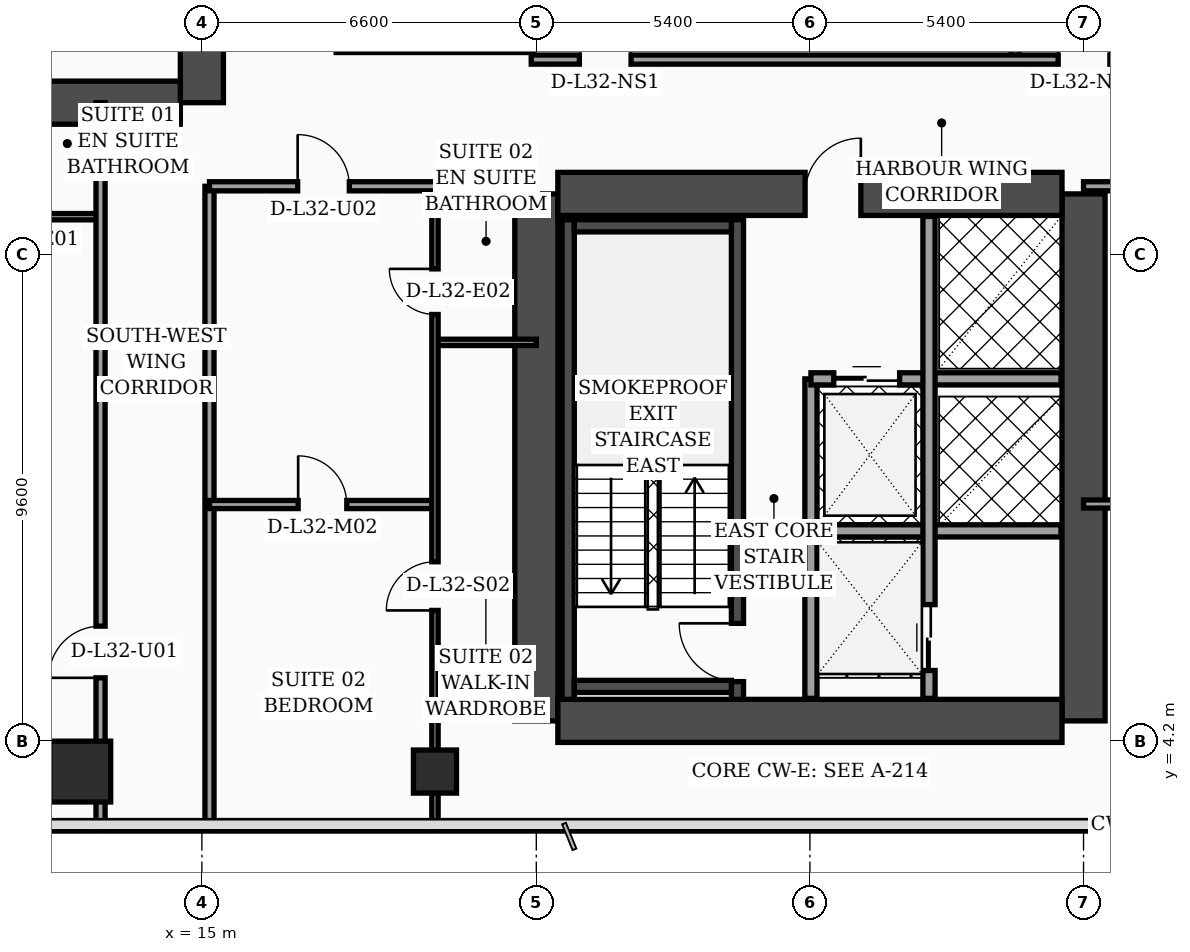
"""IFC4 building model, lengths in metres.
Left out: names, types, materials, properties, quantities, classifications, styles, units other than length and angle.
Written with IfcOpenShell. Run it as: python <this file> out.ifc"""

import sys

from ifc_helpers import new_model, si_unit, direction, frame, frame_2d, origin, origin_2d, place, context, subcontext, project, spatial, rectangle, hollow_rectangle, extrude, element, fill, save


model = new_model("IFC4")
c1 = context("Model", 3, precision=1e-05, world=origin(), true_north=direction((0.0, 1.0)))
c2 = subcontext(c1, "Body", "Model", "MODEL_VIEW")
j1 = project(units=[si_unit("LENGTHUNIT", "METRE"), si_unit("PLANEANGLEUNIT", "RADIAN")], contexts=[c1])
p1 = place(None, origin())
s1 = spatial("IfcSite", under=j1, at=p1, CompositionType="ELEMENT")
p2 = place(p1, origin())
s2 = spatial("IfcBuilding", under=s1, at=p2, CompositionType="ELEMENT")
p3 = place(p2, frame((0.0, 0.0, 131.6)))
s3 = spatial("IfcBuildingStorey", under=s2, at=p3, CompositionType="ELEMENT", Elevation=131.6)
p4 = place(p3, frame((15.0, 16.8, 0.0), z_axis=(0.0, 0.0, 1.0), x_axis=(0.0, 1.0, 0.0)))
e1 = element("IfcWall", 1, at=p4, inside=s3, PredefinedType="SHEAR", context=c2, shape_type="SweptSolid", body=[
    extrude(rectangle(XDim=21.6, YDim=0.85, at=frame_2d((10.8, 0.0))), origin(), (0.0, 0.0, 1.0), 3.56),
])
p5 = place(p4, frame((8.65, 0.0, 0.0)))
e2 = element("IfcOpeningElement", 2, at=p5, cuts=e1, PredefinedType="OPENING", context=c2, shape_type="SweptSolid", body=[
    extrude(rectangle(XDim=1.1, YDim=2.2, at=frame_2d((0.55, 1.1))), frame((0.0, 0.435, 0.0), z_axis=(0.0, -1.0, 0.0), x_axis=(1.0, 0.0, 0.0)), (0.0, 0.0, 1.0), 0.87),
])
p6 = place(p4, frame((10.85, 0.0, 0.0)))
e3 = element("IfcOpeningElement", 3, at=p6, cuts=e1, PredefinedType="OPENING", context=c2, shape_type="SweptSolid", body=[
    extrude(rectangle(XDim=1.1, YDim=2.2, at=frame_2d((0.55, 1.1))), frame((0.0, 0.435, 0.0), z_axis=(0.0, -1.0, 0.0), x_axis=(1.0, 0.0, 0.0)), (0.0, 0.0, 1.0), 0.87),
])
p7 = place(p4, frame((13.5, 0.0, 0.0)))
e4 = element("IfcOpeningElement", 4, at=p7, cuts=e1, PredefinedType="OPENING", context=c2, shape_type="SweptSolid", body=[
    extrude(rectangle(XDim=1.1, YDim=2.2, at=frame_2d((0.55, 1.1))), frame((0.0, 0.435, 0.0), z_axis=(0.0, -1.0, 0.0), x_axis=(1.0, 0.0, 0.0)), (0.0, 0.0, 1.0), 0.87),
])
p8 = place(p4, frame((16.15, 0.0, 0.0)))
e5 = element("IfcOpeningElement", 5, at=p8, cuts=e1, PredefinedType="OPENING", context=c2, shape_type="SweptSolid", body=[
    extrude(rectangle(XDim=1.1, YDim=2.2, at=frame_2d((0.55, 1.1))), frame((0.0, 0.435, 0.0), z_axis=(0.0, -1.0, 0.0), x_axis=(1.0, 0.0, 0.0)), (0.0, 0.0, 1.0), 0.87),
])
p9 = place(p3, frame((4.625, 16.8, 0.0), z_axis=(0.0, 0.0, 1.0), x_axis=(1.0, 0.0, 0.0)))
e6 = element("IfcWall", 6, at=p9, inside=s3, PredefinedType="SHEAR", context=c2, shape_type="SweptSolid", body=[
    extrude(rectangle(XDim=9.95, YDim=0.85, at=frame_2d((4.975, 0.0))), origin(), (0.0, 0.0, 1.0), 3.56),
])
for number, where, z_axis, x_axis in (
    (7, (21.6, 4.6, 0.0), (0.0, 0.0, 1.0), (0.0, 1.0, 0.0)),
    (8, (32.4, 4.6, 0.0), (0.0, 0.0, 1.0), (0.0, 1.0, 0.0)),
):
    element("IfcWall", number, at=place(p3, frame(where, z_axis=z_axis, x_axis=x_axis)), inside=s3, PredefinedType="SHEAR", context=c2, shape_type="SweptSolid", body=[
        extrude(rectangle(XDim=10.4, YDim=0.85, at=frame_2d((5.2, 0.0))), origin(), (0.0, 0.0, 1.0), 3.56),
    ])
p10 = place(p3, frame((22.025, 15.0, 0.0), z_axis=(0.0, 0.0, 1.0), x_axis=(1.0, 0.0, 0.0)))
e9 = element("IfcWall", 9, at=p10, inside=s3, PredefinedType="SHEAR", context=c2, shape_type="SweptSolid", body=[
    extrude(rectangle(XDim=9.95, YDim=0.85, at=frame_2d((4.975, 0.0))), origin(), (0.0, 0.0, 1.0), 3.56),
])
p11 = place(p10, frame((4.88, 0.0, 0.0)))
e10 = element("IfcOpeningElement", 10, at=p11, cuts=e9, PredefinedType="OPENING", context=c2, shape_type="SweptSolid", body=[
    extrude(rectangle(XDim=1.1, YDim=2.2, at=frame_2d((0.55, 1.1))), frame((0.0, 0.435, 0.0), z_axis=(0.0, -1.0, 0.0), x_axis=(1.0, 0.0, 0.0)), (0.0, 0.0, 1.0), 0.87),
])
p12 = place(p3, frame((22.025, 4.6, 0.0), z_axis=(0.0, 0.0, 1.0), x_axis=(1.0, 0.0, 0.0)))
e11 = element("IfcWall", 11, at=p12, inside=s3, PredefinedType="SHEAR", context=c2, shape_type="SweptSolid", body=[
    extrude(rectangle(XDim=9.95, YDim=0.85, at=frame_2d((4.975, 0.0))), origin(), (0.0, 0.0, 1.0), 3.56),
])
p13 = place(p3, frame((22.23, 5.025, 0.0), z_axis=(0.0, 0.0, 1.0), x_axis=(0.0, 1.0, 0.0)))
e12 = element("IfcWall", 12, at=p13, inside=s3, PredefinedType="SOLIDWALL", context=c2, shape_type="SweptSolid", body=[
    extrude(rectangle(XDim=9.465, YDim=0.24, at=frame_2d((4.732, 0.0))), origin(), (0.0, 0.0, 1.0), 3.56),
])
p14 = place(p3, frame((25.57, 5.025, 0.0), z_axis=(0.0, 0.0, 1.0), x_axis=(0.0, 1.0, 0.0)))
e13 = element("IfcWall", 13, at=p14, inside=s3, PredefinedType="SOLIDWALL", context=c2, shape_type="SweptSolid", body=[
    extrude(rectangle(XDim=9.465, YDim=0.24, at=frame_2d((4.732, 0.0))), origin(), (0.0, 0.0, 1.0), 3.56),
])
p15 = place(p14, frame((0.35, 0.0, 0.0)))
e14 = element("IfcOpeningElement", 14, at=p15, cuts=e13, PredefinedType="OPENING", context=c2, shape_type="SweptSolid", body=[
    extrude(rectangle(XDim=1.15, YDim=2.2, at=frame_2d((0.575, 1.1))), frame((0.0, 0.13, 0.0), z_axis=(0.0, -1.0, 0.0), x_axis=(1.0, 0.0, 0.0)), (0.0, 0.0, 1.0), 0.26),
])
for number, where, z_axis, x_axis in (
    (15, (22.35, 5.28, 0.0), (0.0, 0.0, 1.0), (1.0, 0.0, 0.0)),
    (16, (22.35, 14.37, 0.0), (0.0, 0.0, 1.0), (1.0, 0.0, 0.0)),
):
    element("IfcWall", number, at=place(p3, frame(where, z_axis=z_axis, x_axis=x_axis)), inside=s3, PredefinedType="SOLIDWALL", context=c2, shape_type="SweptSolid", body=[
        extrude(rectangle(XDim=3.1, YDim=0.24, at=frame_2d((1.55, 0.0))), origin(), (0.0, 0.0, 1.0), 3.56),
    ])
p16 = place(p3, frame((12.6, 3.6, 0.0), z_axis=(0.0, 0.0, 1.0), x_axis=(1.0, 0.0, 0.0)))
e17 = element("IfcColumn", 17, at=p16, inside=s3, PredefinedType="COLUMN", context=c2, shape_type="SweptSolid", body=[
    extrude(rectangle(XDim=1.2, YDim=1.2, at=origin_2d()), origin(), (0.0, 0.0, 1.0), 3.56),
])
p17 = place(p3, frame((19.6, 3.6, 0.0), z_axis=(0.0, 0.0, 1.0), x_axis=(1.0, 0.0, 0.0)))
e18 = element("IfcColumn", 18, at=p17, inside=s3, PredefinedType="COLUMN", context=c2, shape_type="SweptSolid", body=[
    extrude(hollow_rectangle(XDim=0.85, YDim=0.85, WallThickness=0.036, at=origin_2d()), origin(), (0.0, 0.0, 1.0), 3.56),
])
p18 = place(p3, frame((27.02, 5.045, 0.0), z_axis=(0.0, 0.0, 1.0), x_axis=(0.0, 1.0, 0.0)))
e19 = element("IfcWall", 19, at=p18, inside=s3, PredefinedType="SOLIDWALL", context=c2, shape_type="SweptSolid", body=[
    extrude(rectangle(XDim=6.305, YDim=0.24, at=frame_2d((3.153, 0.0))), origin(), (0.0, 0.0, 1.0), 3.56),
])
p19 = place(p3, frame((27.02, 11.35, 0.0), z_axis=(0.0, 0.0, 1.0), x_axis=(1.0, 0.0, 0.0)))
e20 = element("IfcWall", 20, at=p19, inside=s3, PredefinedType="SOLIDWALL", context=c2, shape_type="SweptSolid", body=[
    extrude(rectangle(XDim=4.935, YDim=0.24, at=frame_2d((2.468, 0.0))), origin(), (0.0, 0.0, 1.0), 3.56),
])
p20 = place(p19, frame((0.45, 0.0, 0.0)))
e21 = element("IfcOpeningElement", 21, at=p20, cuts=e20, PredefinedType="OPENING", context=c2, shape_type="SweptSolid", body=[
    extrude(rectangle(XDim=1.3, YDim=2.35, at=frame_2d((0.65, 1.175))), frame((0.0, 0.13, 0.0), z_axis=(0.0, -1.0, 0.0), x_axis=(1.0, 0.0, 0.0)), (0.0, 0.0, 1.0), 0.26),
])
p21 = place(p3, frame((27.02, 8.35, 0.0), z_axis=(0.0, 0.0, 1.0), x_axis=(1.0, 0.0, 0.0)))
e22 = element("IfcWall", 22, at=p21, inside=s3, PredefinedType="SOLIDWALL", context=c2, shape_type="SweptSolid", body=[
    extrude(rectangle(XDim=4.935, YDim=0.24, at=frame_2d((2.468, 0.0))), origin(), (0.0, 0.0, 1.0), 3.56),
])
p22 = place(p3, frame((29.35, 5.045, 0.0), z_axis=(0.0, 0.0, 1.0), x_axis=(0.0, 1.0, 0.0)))
e23 = element("IfcWall", 23, at=p22, inside=s3, PredefinedType="SOLIDWALL", context=c2, shape_type="SweptSolid", body=[
    extrude(rectangle(XDim=9.51, YDim=0.24, at=frame_2d((4.755, 0.0))), origin(), (0.0, 0.0, 1.0), 3.56),
])
p23 = place(p22, frame((0.55, 0.0, 0.0)))
e24 = element("IfcOpeningElement", 24, at=p23, cuts=e23, PredefinedType="OPENING", context=c2, shape_type="SweptSolid", body=[
    extrude(rectangle(XDim=1.3, YDim=2.35, at=frame_2d((0.65, 1.175))), frame((0.0, 0.13, 0.0), z_axis=(0.0, -1.0, 0.0), x_axis=(1.0, 0.0, 0.0)), (0.0, 0.0, 1.0), 0.26),
])
p24 = place(p3, frame((3.2, 14.55, 0.0), z_axis=(0.0, 0.0, 1.0), x_axis=(1.0, 0.0, 0.0)))
e25 = element("IfcWall", 25, at=p24, inside=s3, PredefinedType="PARTITIONING", context=c2, shape_type="SweptSolid", body=[
    extrude(rectangle(XDim=9.8, YDim=0.125, at=frame_2d((4.9, 0.0))), origin(), (0.0, 0.0, 1.0), 2.84),
])
p25 = place(p24, frame((3.32, 0.0, 0.0)))
e26 = element("IfcOpeningElement", 26, at=p25, cuts=e25, PredefinedType="OPENING", context=c2, shape_type="SweptSolid", body=[
    extrude(rectangle(XDim=0.96, YDim=2.2, at=frame_2d((0.48, 1.1))), frame((0.0, 0.073, 0.0), z_axis=(0.0, -1.0, 0.0), x_axis=(1.0, 0.0, 0.0)), (0.0, 0.0, 1.0), 0.145),
])
p26 = place(p24, frame((7.89, 0.0, 0.0)))
e27 = element("IfcOpeningElement", 27, at=p26, cuts=e25, PredefinedType="OPENING", context=c2, shape_type="SweptSolid", body=[
    extrude(rectangle(XDim=0.9, YDim=2.15, at=frame_2d((0.45, 1.075))), frame((0.0, 0.073, 0.0), z_axis=(0.0, -1.0, 0.0), x_axis=(1.0, 0.0, 0.0)), (0.0, 0.0, 1.0), 0.145),
])
p27 = place(p3, frame((13.0, 2.44, 0.0), z_axis=(0.0, 0.0, 1.0), x_axis=(0.0, 1.0, 0.0)))
e28 = element("IfcWall", 28, at=p27, inside=s3, PredefinedType="PARTITIONING", context=c2, shape_type="SweptSolid", body=[
    extrude(rectangle(XDim=14.36, YDim=0.18, at=frame_2d((7.18, 0.0))), origin(), (0.0, 0.0, 1.0), 2.84),
])
p28 = place(p27, frame((3.01, 0.0, 0.0)))
e29 = element("IfcOpeningElement", 29, at=p28, cuts=e28, PredefinedType="OPENING", context=c2, shape_type="SweptSolid", body=[
    extrude(rectangle(XDim=1.02, YDim=2.2, at=frame_2d((0.51, 1.1))), frame((0.0, 0.1, 0.0), z_axis=(0.0, -1.0, 0.0), x_axis=(1.0, 0.0, 0.0)), (0.0, 0.0, 1.0), 0.2),
])
p29 = place(p3, frame((15.15, 2.44, 0.0), z_axis=(0.0, 0.0, 1.0), x_axis=(0.0, 1.0, 0.0)))
e30 = element("IfcWall", 30, at=p29, inside=s3, PredefinedType="PARTITIONING", context=c2, shape_type="SweptSolid", body=[
    extrude(rectangle(XDim=12.71, YDim=0.18, at=frame_2d((6.355, 0.0))), origin(), (0.0, 0.0, 1.0), 3.04),
])
p30 = place(p3, frame((19.6, 12.07, 0.0), z_axis=(0.0, 0.0, 1.0), x_axis=(1.0, 0.0, 0.0)))
e31 = element("IfcWall", 31, at=p30, inside=s3, PredefinedType="PARTITIONING", context=c2, shape_type="SweptSolid", body=[
    extrude(rectangle(XDim=2.0, YDim=0.125, at=frame_2d((1.0, 0.0))), origin(), (0.0, 0.0, 1.0), 3.56),
])
p31 = place(p3, frame((15.15, 8.87, 0.0), z_axis=(0.0, 0.0, 1.0), x_axis=(1.0, 0.0, 0.0)))
e32 = element("IfcWall", 32, at=p31, inside=s3, PredefinedType="PARTITIONING", context=c2, shape_type="SweptSolid", body=[
    extrude(rectangle(XDim=4.45, YDim=0.16, at=frame_2d((2.225, 0.0))), origin(), (0.0, 0.0, 1.0), 3.56),
])
p32 = place(p31, frame((1.75, 0.0, 0.0)))
e33 = element("IfcOpeningElement", 33, at=p32, cuts=e32, PredefinedType="OPENING", context=c2, shape_type="SweptSolid", body=[
    extrude(rectangle(XDim=0.96, YDim=2.2, at=frame_2d((0.48, 1.1))), frame((0.0, 0.09, 0.0), z_axis=(0.0, -1.0, 0.0), x_axis=(1.0, 0.0, 0.0)), (0.0, 0.0, 1.0), 0.18),
])
p33 = place(p3, frame((19.6, 2.44, 0.0), z_axis=(0.0, 0.0, 1.0), x_axis=(0.0, 1.0, 0.0)))
e34 = element("IfcWall", 34, at=p33, inside=s3, PredefinedType="PARTITIONING", context=c2, shape_type="SweptSolid", body=[
    extrude(rectangle(XDim=12.71, YDim=0.125, at=frame_2d((6.355, 0.0))), origin(), (0.0, 0.0, 1.0), 2.49),
])
p34 = place(p33, frame((4.34, 0.0, 0.0)))
e35 = element("IfcOpeningElement", 35, at=p34, cuts=e34, PredefinedType="OPENING", context=c2, shape_type="SweptSolid", body=[
    extrude(rectangle(XDim=0.96, YDim=2.2, at=frame_2d((0.48, 1.1))), frame((0.0, 0.073, 0.0), z_axis=(0.0, -1.0, 0.0), x_axis=(1.0, 0.0, 0.0)), (0.0, 0.0, 1.0), 0.145),
])
p35 = place(p33, frame((10.18, 0.0, 0.0)))
e36 = element("IfcOpeningElement", 36, at=p35, cuts=e34, PredefinedType="OPENING", context=c2, shape_type="SweptSolid", body=[
    extrude(rectangle(XDim=0.9, YDim=2.15, at=frame_2d((0.45, 1.075))), frame((0.0, 0.073, 0.0), z_axis=(0.0, -1.0, 0.0), x_axis=(1.0, 0.0, 0.0)), (0.0, 0.0, 1.0), 0.145),
])
p36 = place(p3, frame((15.15, 15.15, 0.0), z_axis=(0.0, 0.0, 1.0), x_axis=(1.0, 0.0, 0.0)))
e37 = element("IfcWall", 37, at=p36, inside=s3, PredefinedType="PARTITIONING", context=c2, shape_type="SweptSolid", body=[
    extrude(rectangle(XDim=6.45, YDim=0.18, at=frame_2d((3.225, 0.0))), origin(), (0.0, 0.0, 1.0), 2.49),
])
p37 = place(p36, frame((1.74, 0.0, 0.0)))
e38 = element("IfcOpeningElement", 38, at=p37, cuts=e37, PredefinedType="OPENING", context=c2, shape_type="SweptSolid", body=[
    extrude(rectangle(XDim=1.02, YDim=2.2, at=frame_2d((0.51, 1.1))), frame((0.0, 0.1, 0.0), z_axis=(0.0, -1.0, 0.0), x_axis=(1.0, 0.0, 0.0)), (0.0, 0.0, 1.0), 0.2),
])
p38 = place(p3, frame((17.65, 17.88, 0.0), z_axis=(0.0, 0.0, 1.0), x_axis=(1.0, 0.0, 0.0)))
e39 = element("IfcWall", 39, at=p38, inside=s3, PredefinedType="PARTITIONING", context=c2, shape_type="SweptSolid", body=[
    extrude(rectangle(XDim=3.9, YDim=0.18, at=frame_2d((1.95, 0.0))), origin(), (0.0, 0.0, 1.0), 3.56),
])
p39 = place(p3, frame((32.4, 8.88, 0.0), z_axis=(0.0, 0.0, 1.0), x_axis=(1.0, 0.0, 0.0)))
e40 = element("IfcWall", 40, at=p39, inside=s3, PredefinedType="PARTITIONING", context=c2, shape_type="SweptSolid", body=[
    extrude(rectangle(XDim=7.02, YDim=0.16, at=frame_2d((3.51, 0.0))), origin(), (0.0, 0.0, 1.0), 2.84),
])
p40 = place(p39, frame((3.03, 0.0, 0.0)))
e41 = element("IfcOpeningElement", 41, at=p40, cuts=e40, PredefinedType="OPENING", context=c2, shape_type="SweptSolid", body=[
    extrude(rectangle(XDim=0.96, YDim=2.2, at=frame_2d((0.48, 1.1))), frame((0.0, 0.09, 0.0), z_axis=(0.0, -1.0, 0.0), x_axis=(1.0, 0.0, 0.0)), (0.0, 0.0, 1.0), 0.18),
])
p41 = place(p3, frame((32.4, 15.15, 0.0), z_axis=(0.0, 0.0, 1.0), x_axis=(1.0, 0.0, 0.0)))
e42 = element("IfcWall", 42, at=p41, inside=s3, PredefinedType="PARTITIONING", context=c2, shape_type="SweptSolid", body=[
    extrude(rectangle(XDim=9.15, YDim=0.18, at=frame_2d((4.575, 0.0))), origin(), (0.0, 0.0, 1.0), 2.84),
])
p42 = place(p41, frame((3.1, 0.0, 0.0)))
e43 = element("IfcOpeningElement", 43, at=p42, cuts=e42, PredefinedType="OPENING", context=c2, shape_type="SweptSolid", body=[
    extrude(rectangle(XDim=1.02, YDim=2.2, at=frame_2d((0.51, 1.1))), frame((0.0, 0.1, 0.0), z_axis=(0.0, -1.0, 0.0), x_axis=(1.0, 0.0, 0.0)), (0.0, 0.0, 1.0), 0.2),
])
p43 = place(p3, frame((31.05, 17.65, 0.0), z_axis=(0.0, 0.0, 1.0), x_axis=(0.0, 1.0, 0.0)))
e44 = element("IfcWall", 44, at=p43, inside=s3, PredefinedType="PARTITIONING", context=c2, shape_type="SweptSolid", body=[
    extrude(rectangle(XDim=12.1, YDim=0.16, at=frame_2d((6.05, 0.0))), origin(), (0.0, 0.0, 1.0), 2.84),
])
p44 = place(p3, frame((21.5, 17.65, 0.0), z_axis=(0.0, 0.0, 1.0), x_axis=(1.0, 0.0, 0.0)))
e45 = element("IfcWall", 45, at=p44, inside=s3, PredefinedType="PARTITIONING", context=c2, shape_type="SweptSolid", body=[
    extrude(rectangle(XDim=17.7, YDim=0.18, at=frame_2d((8.85, 0.0))), origin(), (0.0, 0.0, 1.0), 2.84),
])
p45 = place(p44, frame((0.95, 0.0, 0.0)))
e46 = element("IfcOpeningElement", 46, at=p45, cuts=e45, PredefinedType="OPENING", context=c2, shape_type="SweptSolid", body=[
    extrude(rectangle(XDim=1.02, YDim=2.2, at=frame_2d((0.51, 1.1))), frame((0.0, 0.1, 0.0), z_axis=(0.0, -1.0, 0.0), x_axis=(1.0, 0.0, 0.0)), (0.0, 0.0, 1.0), 0.2),
])
p46 = place(p44, frame((10.4, 0.0, 0.0)))
e47 = element("IfcOpeningElement", 47, at=p46, cuts=e45, PredefinedType="OPENING", context=c2, shape_type="SweptSolid", body=[
    extrude(rectangle(XDim=1.02, YDim=2.2, at=frame_2d((0.51, 1.1))), frame((0.0, 0.1, 0.0), z_axis=(0.0, -1.0, 0.0), x_axis=(1.0, 0.0, 0.0)), (0.0, 0.0, 1.0), 0.2),
])
p47 = place(p20, origin())
e48 = element("IfcDoor", 48, at=p47, inside=s3, OperationType="DOUBLE_DOOR_SLIDING", PredefinedType="DOOR", context=c2, shape_type="SweptSolid", body=[
    extrude(rectangle(XDim=1.3, YDim=2.35, at=frame_2d((0.65, 1.175))), frame((0.0, 0.025, 0.0), z_axis=(0.0, -1.0, 0.0), x_axis=(1.0, 0.0, 0.0)), (0.0, 0.0, 1.0), 0.05),
])
fill(e21, e48)
p48 = place(p23, origin())
e49 = element("IfcDoor", 49, at=p48, inside=s3, OperationType="DOUBLE_DOOR_SLIDING", PredefinedType="DOOR", context=c2, shape_type="SweptSolid", body=[
    extrude(rectangle(XDim=1.3, YDim=2.35, at=frame_2d((0.65, 1.175))), frame((0.0, 0.025, 0.0), z_axis=(0.0, -1.0, 0.0), x_axis=(1.0, 0.0, 0.0)), (0.0, 0.0, 1.0), 0.05),
])
fill(e24, e49)
p49 = place(p28, origin())
e50 = element("IfcDoor", 50, at=p49, inside=s3, OperationType="SINGLE_SWING_LEFT", PredefinedType="DOOR", context=c2, shape_type="SweptSolid", body=[
    extrude(rectangle(XDim=1.02, YDim=2.2, at=frame_2d((0.51, 1.1))), frame((0.0, 0.025, 0.0), z_axis=(0.0, -1.0, 0.0), x_axis=(1.0, 0.0, 0.0)), (0.0, 0.0, 1.0), 0.05),
])
fill(e29, e50)
p50 = place(p32, origin())
e51 = element("IfcDoor", 51, at=p50, inside=s3, OperationType="SINGLE_SWING_LEFT", PredefinedType="DOOR", context=c2, shape_type="SweptSolid", body=[
    extrude(rectangle(XDim=0.96, YDim=2.2, at=frame_2d((0.48, 1.1))), frame((0.0, 0.025, 0.0), z_axis=(0.0, -1.0, 0.0), x_axis=(1.0, 0.0, 0.0)), (0.0, 0.0, 1.0), 0.05),
])
fill(e33, e51)
p51 = place(p34, origin())
e52 = element("IfcDoor", 52, at=p51, inside=s3, OperationType="SINGLE_SWING_LEFT", PredefinedType="DOOR", context=c2, shape_type="SweptSolid", body=[
    extrude(rectangle(XDim=0.96, YDim=2.2, at=frame_2d((0.48, 1.1))), frame((0.0, 0.025, 0.0), z_axis=(0.0, -1.0, 0.0), x_axis=(1.0, 0.0, 0.0)), (0.0, 0.0, 1.0), 0.05),
])
fill(e35, e52)
p52 = place(p35, origin())
e53 = element("IfcDoor", 53, at=p52, inside=s3, OperationType="SINGLE_SWING_RIGHT", PredefinedType="DOOR", context=c2, shape_type="SweptSolid", body=[
    extrude(rectangle(XDim=0.9, YDim=2.15, at=frame_2d((0.45, 1.075))), frame((0.0, 0.025, 0.0), z_axis=(0.0, -1.0, 0.0), x_axis=(1.0, 0.0, 0.0)), (0.0, 0.0, 1.0), 0.05),
])
fill(e36, e53)
p53 = place(p37, origin())
e54 = element("IfcDoor", 54, at=p53, inside=s3, OperationType="SINGLE_SWING_LEFT", PredefinedType="DOOR", context=c2, shape_type="SweptSolid", body=[
    extrude(rectangle(XDim=1.02, YDim=2.2, at=frame_2d((0.51, 1.1))), frame((0.0, 0.025, 0.0), z_axis=(0.0, -1.0, 0.0), x_axis=(1.0, 0.0, 0.0)), (0.0, 0.0, 1.0), 0.05),
])
fill(e38, e54)
p54 = place(p45, origin())
e55 = element("IfcDoor", 55, at=p54, inside=s3, OperationType="SINGLE_SWING_RIGHT", PredefinedType="DOOR", context=c2, shape_type="SweptSolid", body=[
    extrude(rectangle(XDim=1.02, YDim=2.2, at=frame_2d((0.51, 1.1))), frame((0.0, 0.025, 0.0), z_axis=(0.0, -1.0, 0.0), x_axis=(1.0, 0.0, 0.0)), (0.0, 0.0, 1.0), 0.05),
])
fill(e46, e55)
p55 = place(p46, origin())
e56 = element("IfcDoor", 56, at=p55, inside=s3, OperationType="SINGLE_SWING_LEFT", PredefinedType="DOOR", context=c2, shape_type="SweptSolid", body=[
    extrude(rectangle(XDim=1.02, YDim=2.2, at=frame_2d((0.51, 1.1))), frame((0.0, 0.025, 0.0), z_axis=(0.0, -1.0, 0.0), x_axis=(1.0, 0.0, 0.0)), (0.0, 0.0, 1.0), 0.05),
])
fill(e47, e56)
p56 = place(p15, origin())
e57 = element("IfcDoor", 57, at=p56, inside=s3, OperationType="SINGLE_SWING_RIGHT", PredefinedType="DOOR", context=c2, shape_type="SweptSolid", body=[
    extrude(rectangle(XDim=1.15, YDim=2.2, at=frame_2d((0.575, 1.1))), frame((0.0, 0.025, 0.0), z_axis=(0.0, -1.0, 0.0), x_axis=(1.0, 0.0, 0.0)), (0.0, 0.0, 1.0), 0.05),
])
fill(e14, e57)
p57 = place(p11, origin())
e58 = element("IfcDoor", 58, at=p57, inside=s3, OperationType="SINGLE_SWING_RIGHT", PredefinedType="DOOR", context=c2, shape_type="SweptSolid", body=[
    extrude(rectangle(XDim=1.1, YDim=2.2, at=frame_2d((0.55, 1.1))), frame((0.0, 0.025, 0.0), z_axis=(0.0, -1.0, 0.0), x_axis=(1.0, 0.0, 0.0)), (0.0, 0.0, 1.0), 0.05),
])
fill(e10, e58)
save(model, sys.argv[1])
